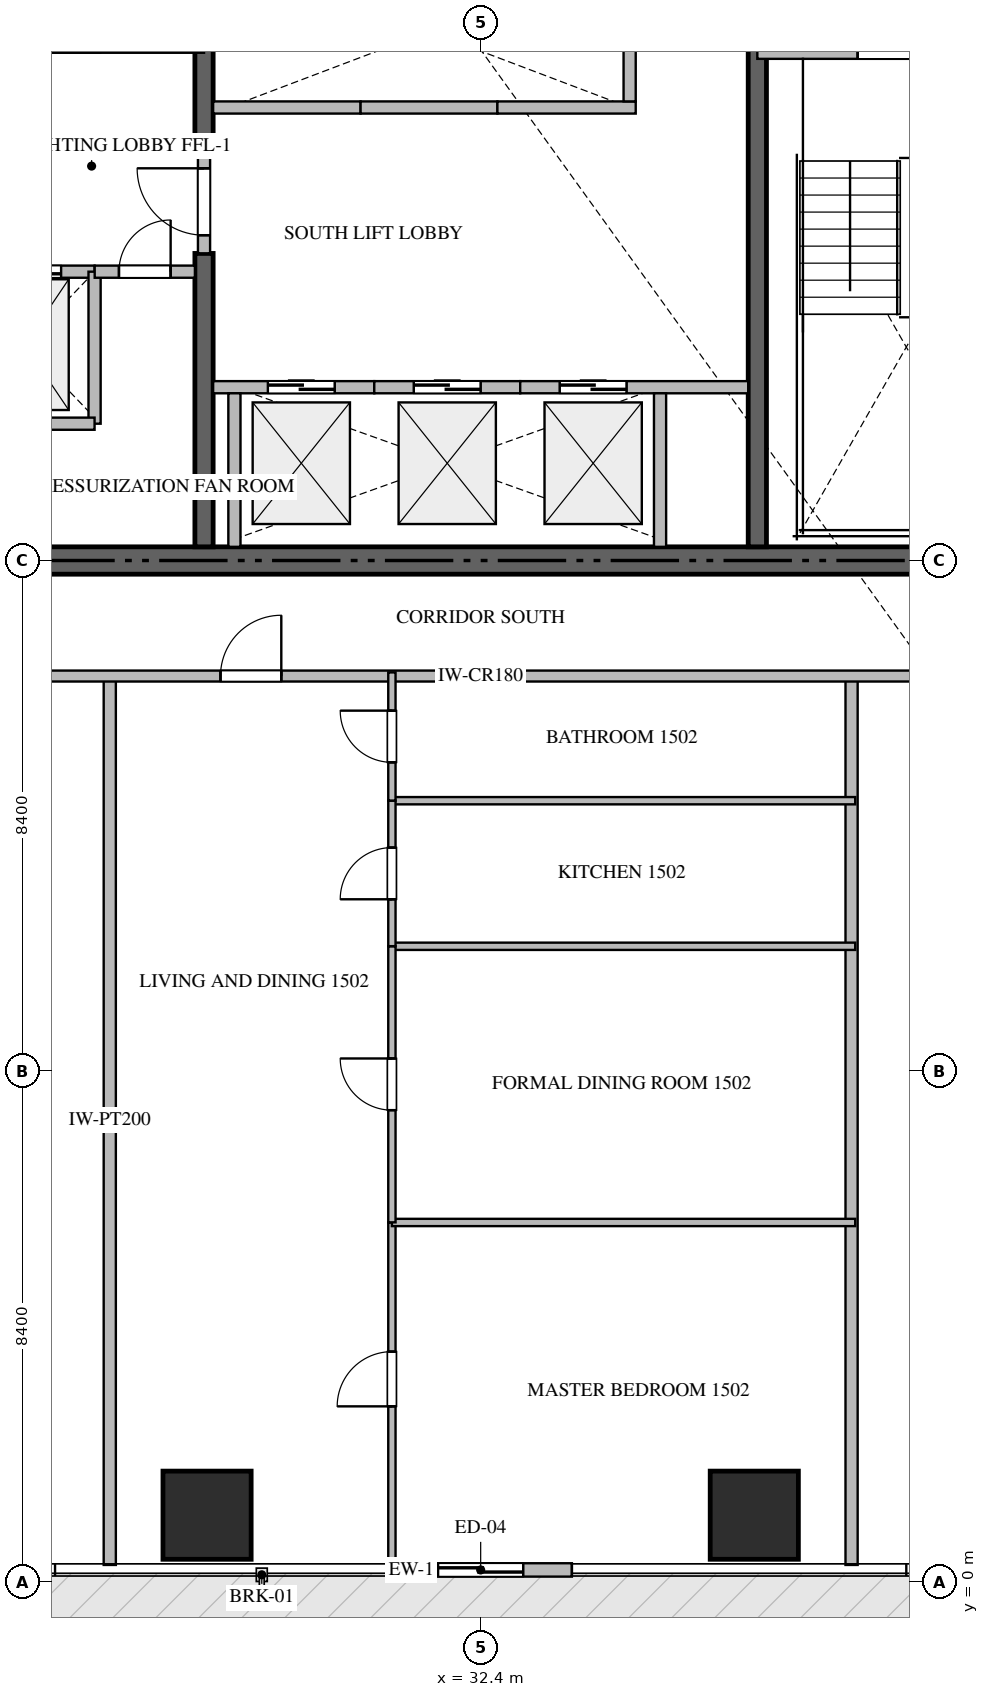
"""IFC4 building model, lengths in metres.
Left out: names, types, materials, properties, quantities, classifications, styles, units other than length and angle.
Written with IfcOpenShell. Run it as: python <this file> out.ifc"""

import sys

from ifc_helpers import new_model, si_unit, direction, frame, frame_2d, origin, origin_2d, place, context, subcontext, project, spatial, rectangle, extrude, source, transform, mapped, element, fill, save


model = new_model("IFC4")
c1 = context("Model", 3, precision=1e-05, world=origin(), true_north=direction((0.0, 1.0)))
c2 = subcontext(c1, "Body", "Model", "MODEL_VIEW")
j1 = project(units=[si_unit("LENGTHUNIT", "METRE"), si_unit("PLANEANGLEUNIT", "RADIAN")], contexts=[c1])
p1 = place(None, origin())
s1 = spatial("IfcSite", under=j1, at=p1, CompositionType="ELEMENT")
p2 = place(p1, origin())
s2 = spatial("IfcBuilding", under=s1, at=p2, CompositionType="ELEMENT")
p3 = place(p2, frame((0.0, 0.0, 64.2)))
s3 = spatial("IfcBuildingStorey", under=s2, at=p3, CompositionType="ELEMENT", Elevation=64.2)
p4 = place(p3, frame((23.4, 16.8, -0.26), z_axis=(0.0, 0.0, 1.0), x_axis=(1.0, 0.0, 0.0)))
e1 = element("IfcWall", 1, at=p4, inside=s3, PredefinedType="SHEAR", context=c2, shape_type="SweptSolid", body=[
    extrude(rectangle(XDim=18.0, YDim=0.45, at=frame_2d((9.0, 0.0))), origin(), (0.0, 0.0, 1.0), 3.748),
])
p5 = place(p3, frame((27.85, 17.025, -0.26), z_axis=(0.0, 0.0, 1.0), x_axis=(0.0, 1.0, 0.0)))
e2 = element("IfcWall", 2, at=p5, inside=s3, PredefinedType="SHEAR", context=c2, shape_type="SweptSolid", body=[
    extrude(rectangle(XDim=4.825, YDim=0.3, at=frame_2d((2.413, 0.0))), origin(), (0.0, 0.0, 1.0), 3.748),
])
p6 = place(p3, frame((27.85, 23.55, -0.26), z_axis=(0.0, 0.0, 1.0), x_axis=(0.0, 1.0, 0.0)))
e3 = element("IfcWall", 3, at=p6, inside=s3, PredefinedType="SHEAR", context=c2, shape_type="SweptSolid", body=[
    extrude(rectangle(XDim=9.825, YDim=0.3, at=frame_2d((4.913, 0.0))), origin(), (0.0, 0.0, 1.0), 3.748),
])
p7 = place(p3, frame((36.95, 17.025, -0.26), z_axis=(0.0, 0.0, 1.0), x_axis=(0.0, 1.0, 0.0)))
e4 = element("IfcWall", 4, at=p7, inside=s3, PredefinedType="SHEAR", context=c2, shape_type="SweptSolid", body=[
    extrude(rectangle(XDim=8.325, YDim=0.3, at=frame_2d((4.163, 0.0))), origin(), (0.0, 0.0, 1.0), 3.748),
])
m1 = source(origin(), c2, "Body", "SweptSolid", [
    extrude(rectangle(XDim=1.45, YDim=1.45, at=origin_2d()), origin(), (0.0, 0.0, 1.0), 3.75),
])
for number, where, z_axis, x_axis in (
    (5, (27.9, 1.1, -0.26), (0.0, 0.0, 1.0), (1.0, 0.0, 0.0)),
    (6, (36.9, 1.1, -0.26), (0.0, 0.0, 1.0), (1.0, 0.0, 0.0)),
):
    element("IfcColumn", number, at=place(p3, frame(where, z_axis=z_axis, x_axis=x_axis)), inside=s3, PredefinedType="COLUMN", context=c2, shape_type="MappedRepresentation", body=[
        mapped(m1, transform((0.0, 0.0, 0.0), scale=1.0)),
    ])
p8 = place(p3, frame((30.9, 0.2, 0.0), z_axis=(0.0, 0.0, 1.0), x_axis=(1.0, 0.0, 0.0)))
e7 = element("IfcWall", 7, at=p8, inside=s3, PredefinedType="ELEMENTEDWALL", context=c2, shape_type="SweptSolid", body=[
    extrude(rectangle(XDim=3.0, YDim=0.22, at=frame_2d((1.5, 0.0))), origin(), (0.0, 0.0, 1.0), 3.475),
])
p9 = place(p8, frame((0.8, 0.0, 0.0)))
e8 = element("IfcOpeningElement", 8, at=p9, cuts=e7, PredefinedType="OPENING", context=c2, shape_type="SweptSolid", body=[
    extrude(rectangle(XDim=1.4, YDim=2.25, at=frame_2d((0.7, 1.125))), frame((0.0, 0.12, 0.0), z_axis=(0.0, -1.0, 0.0), x_axis=(1.0, 0.0, 0.0)), (0.0, 0.0, 1.0), 0.24),
])
p10 = place(p3, frame((36.95, 25.15, 0.0), z_axis=(0.0, 0.0, 1.0), x_axis=(1.0, 0.0, 0.0)))
e9 = element("IfcWall", 9, at=p10, inside=s3, PredefinedType="STANDARD", context=c2, shape_type="SweptSolid", body=[
    extrude(rectangle(XDim=4.45, YDim=0.2, at=frame_2d((2.225, 0.0))), origin(), (0.0, 0.0, 1.0), 3.49),
])
p11 = place(p10, frame((1.65, 0.0, 0.0)))
e10 = element("IfcOpeningElement", 10, at=p11, cuts=e9, PredefinedType="OPENING", context=c2, shape_type="SweptSolid", body=[
    extrude(rectangle(XDim=1.1, YDim=2.15, at=frame_2d((0.55, 1.075))), frame((0.0, 0.11, 0.0), z_axis=(0.0, -1.0, 0.0), x_axis=(1.0, 0.0, 0.0)), (0.0, 0.0, 1.0), 0.22),
])
p12 = place(p3, frame((23.625, 21.55, 0.0), z_axis=(0.0, 0.0, 1.0), x_axis=(1.0, 0.0, 0.0)))
e11 = element("IfcWall", 11, at=p12, inside=s3, PredefinedType="STANDARD", context=c2, shape_type="SweptSolid", body=[
    extrude(rectangle(XDim=2.425, YDim=0.2, at=frame_2d((1.212, 0.0))), origin(), (0.0, 0.0, 1.0), 3.49),
])
p13 = place(p12, frame((0.675, 0.0, 0.0)))
e12 = element("IfcOpeningElement", 12, at=p13, cuts=e11, PredefinedType="OPENING", context=c2, shape_type="SweptSolid", body=[
    extrude(rectangle(XDim=1.2, YDim=2.2, at=frame_2d((0.6, 1.1))), frame((0.0, 0.11, 0.0), z_axis=(0.0, -1.0, 0.0), x_axis=(1.0, 0.0, 0.0)), (0.0, 0.0, 1.0), 0.22),
])
p14 = place(p3, frame((28.0, 19.65, 0.0), z_axis=(0.0, 0.0, 1.0), x_axis=(1.0, 0.0, 0.0)))
e13 = element("IfcWall", 13, at=p14, inside=s3, PredefinedType="STANDARD", context=c2, shape_type="SweptSolid", body=[
    extrude(rectangle(XDim=2.65, YDim=0.2, at=frame_2d((1.325, 0.0))), origin(), (0.0, 0.0, 1.0), 3.49),
])
p15 = place(p14, frame((0.9, 0.0, 0.0)))
e14 = element("IfcOpeningElement", 14, at=p15, cuts=e13, PredefinedType="OPENING", context=c2, shape_type="SweptSolid", body=[
    extrude(rectangle(XDim=1.1, YDim=2.2, at=frame_2d((0.55, 1.1))), frame((0.0, 0.11, 0.0), z_axis=(0.0, -1.0, 0.0), x_axis=(1.0, 0.0, 0.0)), (0.0, 0.0, 1.0), 0.22),
])
p16 = place(p3, frame((28.35, 17.025, 0.0), z_axis=(0.0, 0.0, 1.0), x_axis=(0.0, 1.0, 0.0)))
e15 = element("IfcWall", 15, at=p16, inside=s3, PredefinedType="STANDARD", context=c2, shape_type="SweptSolid", body=[
    extrude(rectangle(XDim=2.525, YDim=0.2, at=frame_2d((1.263, 0.0))), origin(), (0.0, 0.0, 1.0), 3.49),
])
p17 = place(p3, frame((30.65, 19.65, 0.0), z_axis=(0.0, 0.0, 1.0), x_axis=(1.0, 0.0, 0.0)))
e16 = element("IfcWall", 16, at=p17, inside=s3, PredefinedType="STANDARD", context=c2, shape_type="SweptSolid", body=[
    extrude(rectangle(XDim=2.4, YDim=0.2, at=frame_2d((1.2, 0.0))), origin(), (0.0, 0.0, 1.0), 3.49),
])
p18 = place(p17, frame((0.65, 0.0, 0.0)))
e17 = element("IfcOpeningElement", 17, at=p18, cuts=e16, PredefinedType="OPENING", context=c2, shape_type="SweptSolid", body=[
    extrude(rectangle(XDim=1.1, YDim=2.2, at=frame_2d((0.55, 1.1))), frame((0.0, 0.11, 0.0), z_axis=(0.0, -1.0, 0.0), x_axis=(1.0, 0.0, 0.0)), (0.0, 0.0, 1.0), 0.22),
])
p19 = place(p3, frame((33.05, 19.65, 0.0), z_axis=(0.0, 0.0, 1.0), x_axis=(1.0, 0.0, 0.0)))
e18 = element("IfcWall", 18, at=p19, inside=s3, PredefinedType="STANDARD", context=c2, shape_type="SweptSolid", body=[
    extrude(rectangle(XDim=3.75, YDim=0.2, at=frame_2d((1.875, 0.0))), origin(), (0.0, 0.0, 1.0), 3.49),
])
p20 = place(p19, frame((0.65, 0.0, 0.0)))
e19 = element("IfcOpeningElement", 19, at=p20, cuts=e18, PredefinedType="OPENING", context=c2, shape_type="SweptSolid", body=[
    extrude(rectangle(XDim=1.1, YDim=2.2, at=frame_2d((0.55, 1.1))), frame((0.0, 0.11, 0.0), z_axis=(0.0, -1.0, 0.0), x_axis=(1.0, 0.0, 0.0)), (0.0, 0.0, 1.0), 0.22),
])
p21 = place(p3, frame((35.35, 17.025, 0.0), z_axis=(0.0, 0.0, 1.0), x_axis=(0.0, 1.0, 0.0)))
e20 = element("IfcWall", 20, at=p21, inside=s3, PredefinedType="STANDARD", context=c2, shape_type="SweptSolid", body=[
    extrude(rectangle(XDim=2.525, YDim=0.2, at=frame_2d((1.263, 0.0))), origin(), (0.0, 0.0, 1.0), 3.49),
])
p22 = place(p3, frame((28.0, 24.25, 0.0), z_axis=(0.0, 0.0, 1.0), x_axis=(1.0, 0.0, 0.0)))
e21 = element("IfcWall", 21, at=p22, inside=s3, PredefinedType="STANDARD", context=c2, shape_type="SweptSolid", body=[
    extrude(rectangle(XDim=2.425, YDim=0.2, at=frame_2d((1.212, 0.0))), origin(), (0.0, 0.0, 1.0), 3.49),
])
p23 = place(p3, frame((30.425, 24.25, 0.0), z_axis=(0.0, 0.0, 1.0), x_axis=(1.0, 0.0, 0.0)))
e22 = element("IfcWall", 22, at=p23, inside=s3, PredefinedType="STANDARD", context=c2, shape_type="SweptSolid", body=[
    extrude(rectangle(XDim=2.25, YDim=0.2, at=frame_2d((1.125, 0.0))), origin(), (0.0, 0.0, 1.0), 3.49),
])
p24 = place(p3, frame((32.675, 24.25, 0.0), z_axis=(0.0, 0.0, 1.0), x_axis=(1.0, 0.0, 0.0)))
e23 = element("IfcWall", 23, at=p24, inside=s3, PredefinedType="STANDARD", context=c2, shape_type="SweptSolid", body=[
    extrude(rectangle(XDim=2.275, YDim=0.2, at=frame_2d((1.137, 0.0))), origin(), (0.0, 0.0, 1.0), 3.49),
])
for number, where, z_axis, x_axis in (
    (24, (34.85, 24.35, 0.0), (0.0, 0.0, 1.0), (0.0, 1.0, 0.0)),
    (25, (26.05, 19.05, 0.0), (0.0, 0.0, 1.0), (0.0, 1.0, 0.0)),
):
    element("IfcWall", number, at=place(p3, frame(where, z_axis=z_axis, x_axis=x_axis)), inside=s3, PredefinedType="STANDARD", context=c2, shape_type="SweptSolid", body=[
        extrude(rectangle(XDim=2.5, YDim=0.2, at=frame_2d((1.25, 0.0))), origin(), (0.0, 0.0, 1.0), 3.49),
    ])
p25 = place(p3, frame((23.625, 19.05, 0.0), z_axis=(0.0, 0.0, 1.0), x_axis=(1.0, 0.0, 0.0)))
e26 = element("IfcWall", 26, at=p25, inside=s3, PredefinedType="STANDARD", context=c2, shape_type="SweptSolid", body=[
    extrude(rectangle(XDim=2.425, YDim=0.2, at=frame_2d((1.212, 0.0))), origin(), (0.0, 0.0, 1.0), 3.49),
])
p26 = place(p3, frame((26.052, 21.55, 0.0), z_axis=(0.0, 0.0, 1.0), x_axis=(1.0, 0.0, 0.0)))
e27 = element("IfcWall", 27, at=p26, inside=s3, PredefinedType="STANDARD", context=c2, shape_type="SweptSolid", body=[
    extrude(rectangle(XDim=1.648, YDim=0.2, at=frame_2d((0.824, 0.0))), origin(), (0.0, 0.0, 1.0), 3.49),
])
p27 = place(p26, frame((0.399, 0.0, 0.0)))
e28 = element("IfcOpeningElement", 28, at=p27, cuts=e27, PredefinedType="OPENING", context=c2, shape_type="SweptSolid", body=[
    extrude(rectangle(XDim=0.85, YDim=2.1, at=frame_2d((0.425, 1.05))), frame((0.0, 0.11, 0.0), z_axis=(0.0, -1.0, 0.0), x_axis=(1.0, 0.0, 0.0)), (0.0, 0.0, 1.0), 0.22),
])
p28 = place(p3, frame((27.85, 21.852, 0.0), z_axis=(0.0, 0.0, 1.0), x_axis=(0.0, 1.0, 0.0)))
e29 = element("IfcWall", 29, at=p28, inside=s3, PredefinedType="STANDARD", context=c2, shape_type="SweptSolid", body=[
    extrude(rectangle(XDim=1.696, YDim=0.2, at=frame_2d((0.848, 0.0))), origin(), (0.0, 0.0, 1.0), 3.49),
])
p29 = place(p28, frame((0.298, 0.0, 0.0)))
e30 = element("IfcOpeningElement", 30, at=p29, cuts=e29, PredefinedType="OPENING", context=c2, shape_type="SweptSolid", body=[
    extrude(rectangle(XDim=1.1, YDim=2.15, at=frame_2d((0.55, 1.075))), frame((0.0, 0.11, 0.0), z_axis=(0.0, -1.0, 0.0), x_axis=(1.0, 0.0, 0.0)), (0.0, 0.0, 1.0), 0.22),
])
for number, where, z_axis, x_axis in (
    (31, (26.3, 0.282, 0.0), (0.0, 0.0, 1.0), (0.0, 1.0, 0.0)),
    (32, (38.5, 0.282, 0.0), (0.0, 0.0, 1.0), (0.0, 1.0, 0.0)),
):
    element("IfcWall", number, at=place(p3, frame(where, z_axis=z_axis, x_axis=x_axis)), inside=s3, PredefinedType="PARTITIONING", context=c2, shape_type="SweptSolid", body=[
        extrude(rectangle(XDim=14.618, YDim=0.2, at=frame_2d((7.309, 0.0))), origin(), (0.0, 0.0, 1.0), 3.49),
    ])
p30 = place(p3, frame((21.402, 14.9, 0.0), z_axis=(0.0, 0.0, 1.0), x_axis=(1.0, 0.0, 0.0)))
e33 = element("IfcWall", 33, at=p30, inside=s3, PredefinedType="PARTITIONING", context=c2, shape_type="SweptSolid", body=[
    extrude(rectangle(XDim=21.996, YDim=0.18, at=frame_2d((10.998, 0.0))), origin(), (0.0, 0.0, 1.0), 3.49),
])
p31 = place(p30, frame((2.1, 0.0, 0.0)))
e34 = element("IfcOpeningElement", 34, at=p31, cuts=e33, PredefinedType="OPENING", context=c2, shape_type="SweptSolid", body=[
    extrude(rectangle(XDim=1.0, YDim=2.15, at=frame_2d((0.5, 1.075))), frame((0.0, 0.1, 0.0), z_axis=(0.0, -1.0, 0.0), x_axis=(1.0, 0.0, 0.0)), (0.0, 0.0, 1.0), 0.2),
])
p32 = place(p30, frame((6.719, 0.0, 0.0)))
e35 = element("IfcOpeningElement", 35, at=p32, cuts=e33, PredefinedType="OPENING", context=c2, shape_type="SweptSolid", body=[
    extrude(rectangle(XDim=1.0, YDim=2.15, at=frame_2d((0.5, 1.075))), frame((0.0, 0.1, 0.0), z_axis=(0.0, -1.0, 0.0), x_axis=(1.0, 0.0, 0.0)), (0.0, 0.0, 1.0), 0.2),
])
p33 = place(p30, frame((18.896, 0.0, 0.0)))
e36 = element("IfcOpeningElement", 36, at=p33, cuts=e33, PredefinedType="OPENING", context=c2, shape_type="SweptSolid", body=[
    extrude(rectangle(XDim=1.0, YDim=2.15, at=frame_2d((0.5, 1.075))), frame((0.0, 0.1, 0.0), z_axis=(0.0, -1.0, 0.0), x_axis=(1.0, 0.0, 0.0)), (0.0, 0.0, 1.0), 0.2),
])
p34 = place(p3, frame((30.94, 0.295, 0.0), z_axis=(0.0, 0.0, 1.0), x_axis=(0.0, 1.0, 0.0)))
e37 = element("IfcWall", 37, at=p34, inside=s3, PredefinedType="PARTITIONING", context=c2, shape_type="SweptSolid", body=[
    extrude(rectangle(XDim=5.619, YDim=0.12, at=frame_2d((2.81, 0.0))), origin(), (0.0, 0.0, 1.0), 3.49),
])
p35 = place(p34, frame((2.595, 0.0, 0.0)))
e38 = element("IfcOpeningElement", 38, at=p35, cuts=e37, PredefinedType="OPENING", context=c2, shape_type="SweptSolid", body=[
    extrude(rectangle(XDim=0.9, YDim=2.1, at=frame_2d((0.45, 1.05))), frame((0.0, 0.07, 0.0), z_axis=(0.0, -1.0, 0.0), x_axis=(1.0, 0.0, 0.0)), (0.0, 0.0, 1.0), 0.14),
])
for number, where, z_axis, x_axis in (
    (39, (30.94, 5.914, 0.0), (0.0, 0.0, 1.0), (1.0, 0.0, 0.0)),
    (40, (30.94, 10.456, 0.0), (0.0, 0.0, 1.0), (1.0, 0.0, 0.0)),
    (41, (30.94, 12.85, 0.0), (0.0, 0.0, 1.0), (1.0, 0.0, 0.0)),
):
    element("IfcWall", number, at=place(p3, frame(where, z_axis=z_axis, x_axis=x_axis)), inside=s3, PredefinedType="PARTITIONING", context=c2, shape_type="SweptSolid", body=[
        extrude(rectangle(XDim=7.62, YDim=0.12, at=frame_2d((3.81, 0.0))), origin(), (0.0, 0.0, 1.0), 3.49),
    ])
p36 = place(p3, frame((30.94, 5.916, 0.0), z_axis=(0.0, 0.0, 1.0), x_axis=(0.0, 1.0, 0.0)))
e42 = element("IfcWall", 42, at=p36, inside=s3, PredefinedType="PARTITIONING", context=c2, shape_type="SweptSolid", body=[
    extrude(rectangle(XDim=4.54, YDim=0.12, at=frame_2d((2.27, 0.0))), origin(), (0.0, 0.0, 1.0), 3.49),
])
p37 = place(p36, frame((1.845, 0.0, 0.0)))
e43 = element("IfcOpeningElement", 43, at=p37, cuts=e42, PredefinedType="OPENING", context=c2, shape_type="SweptSolid", body=[
    extrude(rectangle(XDim=0.85, YDim=2.1, at=frame_2d((0.425, 1.05))), frame((0.0, 0.07, 0.0), z_axis=(0.0, -1.0, 0.0), x_axis=(1.0, 0.0, 0.0)), (0.0, 0.0, 1.0), 0.14),
])
p38 = place(p3, frame((30.94, 10.458, 0.0), z_axis=(0.0, 0.0, 1.0), x_axis=(0.0, 1.0, 0.0)))
e44 = element("IfcWall", 44, at=p38, inside=s3, PredefinedType="PARTITIONING", context=c2, shape_type="SweptSolid", body=[
    extrude(rectangle(XDim=2.392, YDim=0.12, at=frame_2d((1.196, 0.0))), origin(), (0.0, 0.0, 1.0), 3.49),
])
p39 = place(p38, frame((0.771, 0.0, 0.0)))
e45 = element("IfcOpeningElement", 45, at=p39, cuts=e44, PredefinedType="OPENING", context=c2, shape_type="SweptSolid", body=[
    extrude(rectangle(XDim=0.85, YDim=2.1, at=frame_2d((0.425, 1.05))), frame((0.0, 0.07, 0.0), z_axis=(0.0, -1.0, 0.0), x_axis=(1.0, 0.0, 0.0)), (0.0, 0.0, 1.0), 0.14),
])
p40 = place(p3, frame((30.94, 12.852, 0.0), z_axis=(0.0, 0.0, 1.0), x_axis=(0.0, 1.0, 0.0)))
e46 = element("IfcWall", 46, at=p40, inside=s3, PredefinedType="PARTITIONING", context=c2, shape_type="SweptSolid", body=[
    extrude(rectangle(XDim=2.108, YDim=0.12, at=frame_2d((1.054, 0.0))), origin(), (0.0, 0.0, 1.0), 3.49),
])
p41 = place(p40, frame((0.629, 0.0, 0.0)))
e47 = element("IfcOpeningElement", 47, at=p41, cuts=e46, PredefinedType="OPENING", context=c2, shape_type="SweptSolid", body=[
    extrude(rectangle(XDim=0.85, YDim=2.1, at=frame_2d((0.425, 1.05))), frame((0.0, 0.07, 0.0), z_axis=(0.0, -1.0, 0.0), x_axis=(1.0, 0.0, 0.0)), (0.0, 0.0, 1.0), 0.14),
])
m2 = source(origin(), c2, "Body", "SweptSolid", [
    extrude(rectangle(XDim=1.4, YDim=2.25, at=frame_2d((0.7, 1.125))), frame((0.0, 0.025, 0.0), z_axis=(0.0, -1.0, 0.0), x_axis=(1.0, 0.0, 0.0)), (0.0, 0.0, 1.0), 0.05),
])
p42 = place(p9, origin())
e48 = element("IfcDoor", 48, at=p42, inside=s3, OperationType="SLIDING_TO_LEFT", PredefinedType="DOOR", context=c2, shape_type="MappedRepresentation", body=[
    mapped(m2, transform((0.0, 0.0, 0.0), scale=1.0)),
])
fill(e8, e48)
m3 = source(origin(), c2, "Body", "SweptSolid", [
    extrude(rectangle(XDim=1.1, YDim=2.15, at=frame_2d((0.55, 1.075))), frame((0.0, 0.025, 0.0), z_axis=(0.0, -1.0, 0.0), x_axis=(1.0, 0.0, 0.0)), (0.0, 0.0, 1.0), 0.05),
])
p43 = place(p11, origin())
e49 = element("IfcDoor", 49, at=p43, inside=s3, OperationType="SINGLE_SWING_RIGHT", PredefinedType="DOOR", context=c2, shape_type="MappedRepresentation", body=[
    mapped(m3, transform((0.0, 0.0, 0.0), scale=1.0)),
])
fill(e10, e49)
m4 = source(origin(), c2, "Body", "SweptSolid", [
    extrude(rectangle(XDim=1.2, YDim=2.2, at=frame_2d((0.6, 1.1))), frame((0.0, 0.025, 0.0), z_axis=(0.0, -1.0, 0.0), x_axis=(1.0, 0.0, 0.0)), (0.0, 0.0, 1.0), 0.05),
])
p44 = place(p13, origin())
e50 = element("IfcDoor", 50, at=p44, inside=s3, OperationType="DOUBLE_DOOR_SLIDING", PredefinedType="DOOR", context=c2, shape_type="MappedRepresentation", body=[
    mapped(m4, transform((0.0, 0.0, 0.0), scale=1.0)),
])
fill(e12, e50)
m5 = source(origin(), c2, "Body", "SweptSolid", [
    extrude(rectangle(XDim=1.1, YDim=2.2, at=frame_2d((0.55, 1.1))), frame((0.0, 0.025, 0.0), z_axis=(0.0, -1.0, 0.0), x_axis=(1.0, 0.0, 0.0)), (0.0, 0.0, 1.0), 0.05),
])
p45 = place(p15, origin())
e51 = element("IfcDoor", 51, at=p45, inside=s3, OperationType="DOUBLE_DOOR_SLIDING", PredefinedType="DOOR", context=c2, shape_type="MappedRepresentation", body=[
    mapped(m5, transform((0.0, 0.0, 0.0), scale=1.0)),
])
fill(e14, e51)
p46 = place(p18, origin())
e52 = element("IfcDoor", 52, at=p46, inside=s3, OperationType="DOUBLE_DOOR_SLIDING", PredefinedType="DOOR", context=c2, shape_type="MappedRepresentation", body=[
    mapped(m5, transform((0.0, 0.0, 0.0), scale=1.0)),
])
fill(e17, e52)
p47 = place(p20, origin())
e53 = element("IfcDoor", 53, at=p47, inside=s3, OperationType="DOUBLE_DOOR_SLIDING", PredefinedType="DOOR", context=c2, shape_type="MappedRepresentation", body=[
    mapped(m5, transform((0.0, 0.0, 0.0), scale=1.0)),
])
fill(e19, e53)
m6 = source(origin(), c2, "Body", "SweptSolid", [
    extrude(rectangle(XDim=0.85, YDim=2.1, at=frame_2d((0.425, 1.05))), frame((0.0, 0.025, 0.0), z_axis=(0.0, -1.0, 0.0), x_axis=(1.0, 0.0, 0.0)), (0.0, 0.0, 1.0), 0.05),
])
p48 = place(p27, origin())
e54 = element("IfcDoor", 54, at=p48, inside=s3, OperationType="SINGLE_SWING_RIGHT", PredefinedType="DOOR", context=c2, shape_type="MappedRepresentation", body=[
    mapped(m6, transform((0.0, 0.0, 0.0), scale=1.0)),
])
fill(e28, e54)
p49 = place(p29, origin())
e55 = element("IfcDoor", 55, at=p49, inside=s3, OperationType="SINGLE_SWING_RIGHT", PredefinedType="DOOR", context=c2, shape_type="MappedRepresentation", body=[
    mapped(m3, transform((0.0, 0.0, 0.0), scale=1.0)),
])
fill(e30, e55)
m7 = source(origin(), c2, "Body", "SweptSolid", [
    extrude(rectangle(XDim=1.0, YDim=2.15, at=frame_2d((0.5, 1.075))), frame((0.0, 0.025, 0.0), z_axis=(0.0, -1.0, 0.0), x_axis=(1.0, 0.0, 0.0)), (0.0, 0.0, 1.0), 0.05),
])
p50 = place(p32, origin())
e56 = element("IfcDoor", 56, at=p50, inside=s3, OperationType="SINGLE_SWING_RIGHT", PredefinedType="DOOR", context=c2, shape_type="MappedRepresentation", body=[
    mapped(m7, transform((0.0, 0.0, 0.0), scale=1.0)),
])
fill(e35, e56)
m8 = source(origin(), c2, "Body", "SweptSolid", [
    extrude(rectangle(XDim=0.9, YDim=2.1, at=frame_2d((0.45, 1.05))), frame((0.0, 0.025, 0.0), z_axis=(0.0, -1.0, 0.0), x_axis=(1.0, 0.0, 0.0)), (0.0, 0.0, 1.0), 0.05),
])
p51 = place(p35, origin())
e57 = element("IfcDoor", 57, at=p51, inside=s3, OperationType="SINGLE_SWING_LEFT", PredefinedType="DOOR", context=c2, shape_type="MappedRepresentation", body=[
    mapped(m8, transform((0.0, 0.0, 0.0), scale=1.0)),
])
fill(e38, e57)
p52 = place(p37, origin())
e58 = element("IfcDoor", 58, at=p52, inside=s3, OperationType="SINGLE_SWING_RIGHT", PredefinedType="DOOR", context=c2, shape_type="MappedRepresentation", body=[
    mapped(m6, transform((0.0, 0.0, 0.0), scale=1.0)),
])
fill(e43, e58)
p53 = place(p39, origin())
e59 = element("IfcDoor", 59, at=p53, inside=s3, OperationType="SINGLE_SWING_LEFT", PredefinedType="DOOR", context=c2, shape_type="MappedRepresentation", body=[
    mapped(m6, transform((0.0, 0.0, 0.0), scale=1.0)),
])
fill(e45, e59)
p54 = place(p41, origin())
e60 = element("IfcDoor", 60, at=p54, inside=s3, OperationType="SINGLE_SWING_RIGHT", PredefinedType="DOOR", context=c2, shape_type="MappedRepresentation", body=[
    mapped(m6, transform((0.0, 0.0, 0.0), scale=1.0)),
])
fill(e47, e60)
save(model, sys.argv[1])
